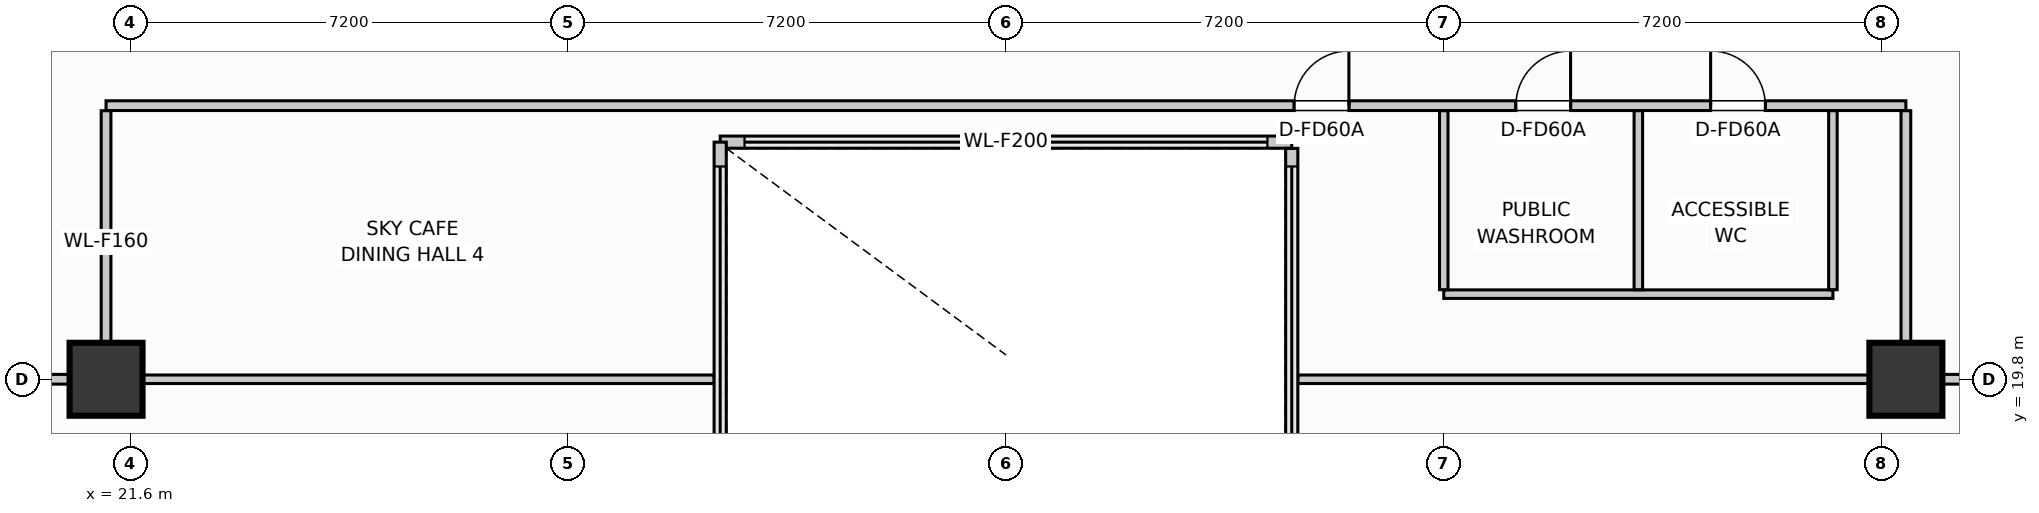
"""IFC4 building model, lengths in metres.
Left out: names, types, materials, properties, quantities, classifications, styles, units other than length and angle.
Written with IfcOpenShell. Run it as: python <this file> out.ifc"""

import sys

from ifc_helpers import new_model, si_unit, direction, frame, frame_2d, origin, origin_2d, place, context, subcontext, project, spatial, rectangle, extrude, element, fill, save


model = new_model("IFC4")
c1 = context("Model", 3, precision=1e-05, world=origin(), true_north=direction((0.0, 1.0)))
c2 = subcontext(c1, "Body", "Model", "MODEL_VIEW")
j1 = project(units=[si_unit("LENGTHUNIT", "METRE"), si_unit("PLANEANGLEUNIT", "RADIAN")], contexts=[c1])
p1 = place(None, origin())
s1 = spatial("IfcSite", under=j1, at=p1, CompositionType="ELEMENT")
p2 = place(p1, origin())
s2 = spatial("IfcBuilding", under=s1, at=p2, CompositionType="ELEMENT")
p3 = place(p2, frame((0.0, 0.0, 105.95)))
s3 = spatial("IfcBuildingStorey", under=s2, at=p3, CompositionType="ELEMENT", Elevation=105.95)
for number, where, z_axis, x_axis in (
    (1, (50.8, 19.8, 0.0), (0.0, 0.0, 1.0), (1.0, 0.0, 0.0)),
    (2, (21.2, 19.8, 0.0), (0.0, 0.0, 1.0), (1.0, 0.0, 0.0)),
):
    element("IfcColumn", number, at=place(p3, frame(where, z_axis=z_axis, x_axis=x_axis)), inside=s3, PredefinedType="COLUMN", context=c2, shape_type="SweptSolid", body=[
        extrude(rectangle(XDim=1.2, YDim=1.2, at=origin_2d()), origin(), (0.0, 0.0, 1.0), 4.5),
    ])
p4 = place(p3, frame((31.3, 23.7, 0.0), z_axis=(0.0, 0.0, 1.0), x_axis=(1.0, 0.0, 0.0)))
e3 = element("IfcWall", 3, at=p4, inside=s3, PredefinedType="PARTITIONING", context=c2, shape_type="SweptSolid", body=[
    extrude(rectangle(XDim=9.4, YDim=0.2, at=frame_2d((4.7, 0.0))), origin(), (0.0, 0.0, 1.0), 4.245),
])
p5 = place(p3, frame((31.3, 16.7, 0.0), z_axis=(0.0, 0.0, 1.0), x_axis=(0.0, 1.0, 0.0)))
e4 = element("IfcWall", 4, at=p5, inside=s3, PredefinedType="PARTITIONING", context=c2, shape_type="SweptSolid", body=[
    extrude(rectangle(XDim=7.0, YDim=0.2, at=frame_2d((3.5, 0.0))), origin(), (0.0, 0.0, 1.0), 4.245),
])
p6 = place(p3, frame((40.7, 23.597, 0.0), z_axis=(0.0, 0.0, 1.0), x_axis=(0.0, -1.0, 0.0)))
e5 = element("IfcWall", 5, at=p6, inside=s3, PredefinedType="PARTITIONING", context=c2, shape_type="SweptSolid", body=[
    extrude(rectangle(XDim=6.794, YDim=0.2, at=frame_2d((3.397, 0.0))), origin(), (0.0, 0.0, 1.0), 4.245),
])
p7 = place(p3, frame((21.2, 24.3, 0.0), z_axis=(0.0, 0.0, 1.0), x_axis=(1.0, 0.0, 0.0)))
e6 = element("IfcWall", 6, at=p7, inside=s3, PredefinedType="PARTITIONING", context=c2, shape_type="SweptSolid", body=[
    extrude(rectangle(XDim=29.6, YDim=0.16, at=frame_2d((14.8, 0.0))), origin(), (0.0, 0.0, 1.0), 4.245),
])
p8 = place(p7, frame((19.54, 0.0, 0.0)))
e7 = element("IfcOpeningElement", 7, at=p8, cuts=e6, PredefinedType="OPENING", context=c2, shape_type="SweptSolid", body=[
    extrude(rectangle(XDim=0.9, YDim=2.0, at=frame_2d((0.45, 1.0))), frame((0.0, 0.09, 0.0), z_axis=(0.0, -1.0, 0.0), x_axis=(1.0, 0.0, 0.0)), (0.0, 0.0, 1.0), 0.18),
])
p9 = place(p7, frame((26.389, 0.0, 0.0)))
e8 = element("IfcOpeningElement", 8, at=p9, cuts=e6, PredefinedType="OPENING", context=c2, shape_type="SweptSolid", body=[
    extrude(rectangle(XDim=0.9, YDim=2.0, at=frame_2d((0.45, 1.0))), frame((0.0, 0.09, 0.0), z_axis=(0.0, -1.0, 0.0), x_axis=(1.0, 0.0, 0.0)), (0.0, 0.0, 1.0), 0.18),
])
p10 = place(p7, frame((23.186, 0.0, 0.0)))
e9 = element("IfcOpeningElement", 9, at=p10, cuts=e6, PredefinedType="OPENING", context=c2, shape_type="SweptSolid", body=[
    extrude(rectangle(XDim=0.9, YDim=2.0, at=frame_2d((0.45, 1.0))), frame((0.0, 0.09, 0.0), z_axis=(0.0, -1.0, 0.0), x_axis=(1.0, 0.0, 0.0)), (0.0, 0.0, 1.0), 0.18),
])
p11 = place(p3, frame((43.2, 21.2, 0.0), z_axis=(0.0, 0.0, 1.0), x_axis=(1.0, 0.0, 0.0)))
e10 = element("IfcWall", 10, at=p11, inside=s3, PredefinedType="PARTITIONING", context=c2, shape_type="SweptSolid", body=[
    extrude(rectangle(XDim=6.4, YDim=0.14, at=frame_2d((3.2, 0.0))), origin(), (0.0, 0.0, 1.0), 4.245),
])
for number, where, z_axis, x_axis in (
    (11, (46.4, 21.273, 0.0), (0.0, 0.0, 1.0), (0.0, 1.0, 0.0)),
    (12, (43.2, 21.273, 0.0), (0.0, 0.0, 1.0), (0.0, 1.0, 0.0)),
    (13, (49.6, 21.273, 0.0), (0.0, 0.0, 1.0), (0.0, 1.0, 0.0)),
):
    element("IfcWall", number, at=place(p3, frame(where, z_axis=z_axis, x_axis=x_axis)), inside=s3, PredefinedType="PARTITIONING", context=c2, shape_type="SweptSolid", body=[
        extrude(rectangle(XDim=2.944, YDim=0.14, at=frame_2d((1.472, 0.0))), origin(), (0.0, 0.0, 1.0), 4.245),
    ])
p12 = place(p3, frame((18.883, 19.8, 0.0), z_axis=(0.0, 0.0, 1.0), x_axis=(1.0, 0.0, 0.0)))
e14 = element("IfcWall", 14, at=p12, inside=s3, PredefinedType="PARTITIONING", context=c2, shape_type="SweptSolid", body=[
    extrude(rectangle(XDim=2.437, YDim=0.16, at=frame_2d((1.219, 0.0))), origin(), (0.0, 0.0, 1.0), 3.618),
])
p13 = place(p3, frame((21.2, 19.883, 0.0), z_axis=(0.0, 0.0, 1.0), x_axis=(0.0, 1.0, 0.0)))
e15 = element("IfcWall", 15, at=p13, inside=s3, PredefinedType="PARTITIONING", context=c2, shape_type="SweptSolid", body=[
    extrude(rectangle(XDim=4.334, YDim=0.16, at=frame_2d((2.167, 0.0))), origin(), (0.0, 0.0, 1.0), 4.245),
])
p14 = place(p3, frame((50.68, 19.8, 0.0), z_axis=(0.0, 0.0, 1.0), x_axis=(1.0, 0.0, 0.0)))
e16 = element("IfcWall", 16, at=p14, inside=s3, PredefinedType="PARTITIONING", context=c2, shape_type="SweptSolid", body=[
    extrude(rectangle(XDim=2.437, YDim=0.16, at=frame_2d((1.219, 0.0))), origin(), (0.0, 0.0, 1.0), 3.618),
])
p15 = place(p3, frame((50.8, 19.883, 0.0), z_axis=(0.0, 0.0, 1.0), x_axis=(0.0, 1.0, 0.0)))
e17 = element("IfcWall", 17, at=p15, inside=s3, PredefinedType="PARTITIONING", context=c2, shape_type="SweptSolid", body=[
    extrude(rectangle(XDim=4.334, YDim=0.16, at=frame_2d((2.167, 0.0))), origin(), (0.0, 0.0, 1.0), 4.245),
])
for number, where, z_axis, x_axis in (
    (18, (21.32, 19.8, 0.0), (0.0, 0.0, 1.0), (1.0, 0.0, 0.0)),
    (19, (40.803, 19.8, 0.0), (0.0, 0.0, 1.0), (1.0, 0.0, 0.0)),
):
    element("IfcWall", number, at=place(p3, frame(where, z_axis=z_axis, x_axis=x_axis)), inside=s3, PredefinedType="PARTITIONING", context=c2, shape_type="SweptSolid", body=[
        extrude(rectangle(XDim=9.877, YDim=0.14, at=frame_2d((4.938, 0.0))), origin(), (0.0, 0.0, 1.0), 4.245),
    ])
p16 = place(p8, origin())
e20 = element("IfcDoor", 20, at=p16, inside=s3, OperationType="SINGLE_SWING_RIGHT", PredefinedType="DOOR", context=c2, shape_type="SweptSolid", body=[
    extrude(rectangle(XDim=0.9, YDim=2.0, at=frame_2d((0.45, 1.0))), frame((0.0, 0.025, 0.0), z_axis=(0.0, -1.0, 0.0), x_axis=(1.0, 0.0, 0.0)), (0.0, 0.0, 1.0), 0.05),
])
fill(e7, e20)
p17 = place(p9, origin())
e21 = element("IfcDoor", 21, at=p17, inside=s3, OperationType="SINGLE_SWING_LEFT", PredefinedType="DOOR", context=c2, shape_type="SweptSolid", body=[
    extrude(rectangle(XDim=0.9, YDim=2.0, at=frame_2d((0.45, 1.0))), frame((0.0, 0.025, 0.0), z_axis=(0.0, -1.0, 0.0), x_axis=(1.0, 0.0, 0.0)), (0.0, 0.0, 1.0), 0.05),
])
fill(e8, e21)
p18 = place(p10, origin())
e22 = element("IfcDoor", 22, at=p18, inside=s3, OperationType="SINGLE_SWING_RIGHT", PredefinedType="DOOR", context=c2, shape_type="SweptSolid", body=[
    extrude(rectangle(XDim=0.9, YDim=2.0, at=frame_2d((0.45, 1.0))), frame((0.0, 0.025, 0.0), z_axis=(0.0, -1.0, 0.0), x_axis=(1.0, 0.0, 0.0)), (0.0, 0.0, 1.0), 0.05),
])
fill(e9, e22)
save(model, sys.argv[1])
